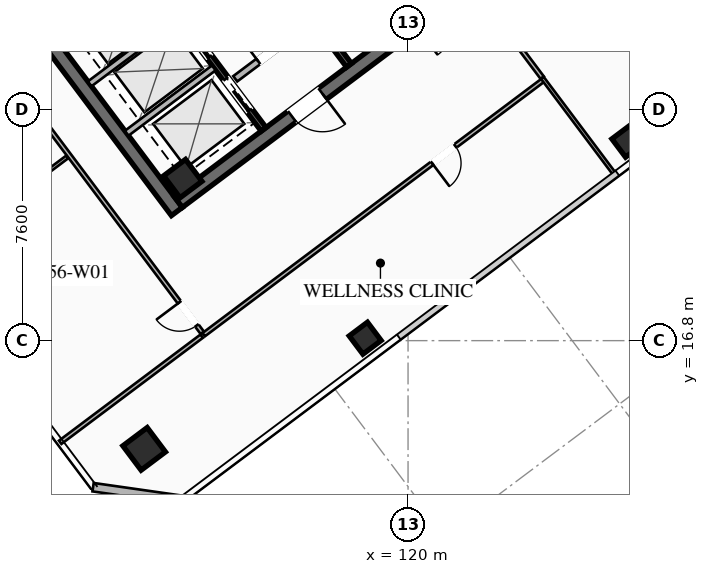
"""IFC4 building model, lengths in metres.
Left out: names, types, materials, properties, quantities, classifications, styles, units other than length and angle.
Written with IfcOpenShell. Run it as: python <this file> out.ifc"""

import sys

from ifc_helpers import new_model, si_unit, direction, frame, frame_2d, origin, origin_2d, place, context, subcontext, project, spatial, rectangle, hollow_rectangle, extrude, element, fill, save


model = new_model("IFC4")
c1 = context("Model", 3, precision=1e-05, world=origin(), true_north=direction((0.0, 1.0)))
c2 = subcontext(c1, "Body", "Model", "MODEL_VIEW")
j1 = project(units=[si_unit("LENGTHUNIT", "METRE"), si_unit("PLANEANGLEUNIT", "RADIAN")], contexts=[c1])
p1 = place(None, origin())
s1 = spatial("IfcSite", under=j1, at=p1, CompositionType="ELEMENT")
p2 = place(p1, origin())
s2 = spatial("IfcBuilding", under=s1, at=p2, CompositionType="ELEMENT")
p3 = place(p2, frame((0.0, 0.0, 207.75)))
s3 = spatial("IfcBuildingStorey", under=s2, at=p3, CompositionType="ELEMENT", Elevation=207.75)
p4 = place(p3, frame((112.396, 21.047, 0.0), z_axis=(0.0, 0.0, 1.0), x_axis=(-0.600005007985, 0.799996243986, 0.0)))
e1 = element("IfcWall", 1, at=p4, inside=s3, PredefinedType="SHEAR", context=c2, shape_type="SweptSolid", body=[
    extrude(rectangle(XDim=15.6, YDim=0.45, at=frame_2d((7.8, 0.0))), origin(), (0.0, 0.0, 1.0), 3.55),
])
p5 = place(p3, frame((124.649, 30.518, 0.0), z_axis=(0.0, 0.0, 1.0), x_axis=(-0.8, -0.6, 0.0)))
e2 = element("IfcWall", 2, at=p5, inside=s3, PredefinedType="SHEAR", context=c2, shape_type="SweptSolid", body=[
    extrude(rectangle(XDim=15.26, YDim=0.45, at=frame_2d((7.63, 0.0))), origin(), (0.0, 0.0, 1.0), 3.55),
])
p6 = place(p5, frame((9.33, 0.0, 0.0)))
e3 = element("IfcOpeningElement", 3, at=p6, cuts=e2, PredefinedType="OPENING", context=c2, shape_type="SweptSolid", body=[
    extrude(rectangle(XDim=1.25, YDim=2.25, at=frame_2d((0.625, 1.125))), frame((0.0, 0.235, 0.0), z_axis=(0.0, -1.0, 0.0), x_axis=(1.0, 0.0, 0.0)), (0.0, 0.0, 1.0), 0.47),
])
p7 = place(p5, frame((4.28, 0.0, 0.0)))
e4 = element("IfcOpeningElement", 4, at=p7, cuts=e2, PredefinedType="OPENING", context=c2, shape_type="SweptSolid", body=[
    extrude(rectangle(XDim=1.25, YDim=2.25, at=frame_2d((0.625, 1.125))), frame((0.0, 0.235, 0.0), z_axis=(0.0, -1.0, 0.0), x_axis=(1.0, 0.0, 0.0)), (0.0, 0.0, 1.0), 0.47),
])
p8 = place(p3, frame((112.59, 22.13, 0.0), z_axis=(0.0, 0.0, 1.0), x_axis=(0.799999996291, 0.600000004945, 0.0)))
e5 = element("IfcColumn", 5, at=p8, inside=s3, PredefinedType="COLUMN", context=c2, shape_type="SweptSolid", body=[
    extrude(hollow_rectangle(XDim=0.9, YDim=0.9, WallThickness=0.04, at=origin_2d()), origin(), (0.0, 0.0, 1.0), 3.37),
])
p9 = place(p3, frame((111.32, 13.24, 0.0), z_axis=(0.0, 0.0, 1.0), x_axis=(0.799999996291, 0.600000004945, 0.0)))
e6 = element("IfcColumn", 6, at=p9, inside=s3, PredefinedType="COLUMN", context=c2, shape_type="SweptSolid", body=[
    extrude(hollow_rectangle(XDim=1.0, YDim=1.0, WallThickness=0.04, at=origin_2d()), origin(), (0.0, 0.0, 1.0), 3.37),
])
for number, where, z_axis, x_axis in (
    (7, (118.59, 16.88, 0.0), (0.0, 0.0, 1.0), (0.8, 0.6, 0.0)),
    (8, (127.23, 23.36, 0.0), (0.0, 0.0, 1.0), (0.8, 0.6, 0.0)),
):
    element("IfcColumn", number, at=place(p3, frame(where, z_axis=z_axis, x_axis=x_axis)), inside=s3, PredefinedType="COLUMN", context=c2, shape_type="SweptSolid", body=[
        extrude(hollow_rectangle(XDim=0.75, YDim=0.75, WallThickness=0.032, at=origin_2d()), origin(), (0.0, 0.0, 1.0), 3.37),
    ])
p10 = place(p3, frame((112.58, 11.56, 0.0), z_axis=(0.0, 0.0, 1.0), x_axis=(-0.989954425158, 0.14138683146, 0.0)))
e9 = element("IfcWall", 9, at=p10, inside=s3, PredefinedType="SOLIDWALL", context=c2, shape_type="SweptSolid", body=[
    extrude(rectangle(XDim=2.97, YDim=0.28, at=frame_2d((1.485, 0.0))), origin(), (0.0, 0.0, 1.0), 3.37),
])
p11 = place(p3, frame((118.058, 25.856, 0.0), z_axis=(0.0, 0.0, 1.0), x_axis=(-0.600002657301, 0.799998007018, 0.0)))
e10 = element("IfcWall", 10, at=p11, inside=s3, PredefinedType="SHEAR", context=c2, shape_type="SweptSolid", body=[
    extrude(rectangle(XDim=14.7, YDim=0.2, at=frame_2d((7.35, 0.0))), origin(), (0.0, 0.0, 1.0), 3.37),
])
p12 = place(p3, frame((114.316, 25.412, 0.0), z_axis=(0.0, 0.0, 1.0), x_axis=(0.800018601094, 0.59997519774, 0.0)))
e11 = element("IfcWall", 11, at=p12, inside=s3, PredefinedType="SOLIDWALL", context=c2, shape_type="SweptSolid", body=[
    extrude(rectangle(XDim=3.15, YDim=0.22, at=frame_2d((1.575, 0.0))), origin(), (0.0, 0.0, 1.0), 2.723),
])
p13 = place(p12, frame((0.95, 0.0, 0.0)))
e12 = element("IfcOpeningElement", 12, at=p13, cuts=e11, PredefinedType="OPENING", context=c2, shape_type="SweptSolid", body=[
    extrude(rectangle(XDim=1.25, YDim=2.25, at=frame_2d((0.625, 1.125))), frame((0.0, 0.12, 0.0), z_axis=(0.0, -1.0, 0.0), x_axis=(1.0, 0.0, 0.0)), (0.0, 0.0, 1.0), 0.24),
])
p14 = place(p3, frame((115.25, 23.75, 0.0), z_axis=(0.0, 0.0, 1.0), x_axis=(-0.599994036198, 0.800004472816, 0.0)))
e13 = element("IfcWall", 13, at=p14, inside=s3, PredefinedType="SHEAR", context=c2, shape_type="SweptSolid", body=[
    extrude(rectangle(XDim=6.55, YDim=0.2, at=frame_2d((3.275, 0.0))), origin(), (0.0, 0.0, 1.0), 3.37),
])
p15 = place(p14, frame((4.975, 0.0, 0.0)))
e14 = element("IfcOpeningElement", 14, at=p15, cuts=e13, PredefinedType="OPENING", context=c2, shape_type="SweptSolid", body=[
    extrude(rectangle(XDim=1.3, YDim=2.25, at=frame_2d((0.65, 1.125))), frame((0.0, 0.11, 0.0), z_axis=(0.0, -1.0, 0.0), x_axis=(1.0, 0.0, 0.0)), (0.0, 0.0, 1.0), 0.22),
])
p16 = place(p14, frame((2.975, 0.0, 0.0)))
e15 = element("IfcOpeningElement", 15, at=p16, cuts=e13, PredefinedType="OPENING", context=c2, shape_type="SweptSolid", body=[
    extrude(rectangle(XDim=1.3, YDim=2.25, at=frame_2d((0.65, 1.125))), frame((0.0, 0.11, 0.0), z_axis=(0.0, -1.0, 0.0), x_axis=(1.0, 0.0, 0.0)), (0.0, 0.0, 1.0), 0.22),
])
p17 = place(p14, frame((0.775, 0.0, 0.0)))
e16 = element("IfcOpeningElement", 16, at=p17, cuts=e13, PredefinedType="OPENING", context=c2, shape_type="SweptSolid", body=[
    extrude(rectangle(XDim=1.3, YDim=2.25, at=frame_2d((0.65, 1.125))), frame((0.0, 0.11, 0.0), z_axis=(0.0, -1.0, 0.0), x_axis=(1.0, 0.0, 0.0)), (0.0, 0.0, 1.0), 0.22),
])
for number, where, z_axis, x_axis in (
    (17, (110.746, 23.622, 0.0), (0.0, 0.0, 1.0), (0.8, 0.6, 0.0)),
    (18, (109.528, 25.246, 0.0), (0.0, 0.0, 1.0), (0.8, 0.6, 0.0)),
):
    element("IfcWall", number, at=place(p3, frame(where, z_axis=z_axis, x_axis=x_axis)), inside=s3, PredefinedType="SOLIDWALL", context=c2, shape_type="SweptSolid", body=[
        extrude(rectangle(XDim=3.58, YDim=0.2, at=frame_2d((1.79, 0.0))), origin(), (0.0, 0.0, 1.0), 3.37),
    ])
p18 = place(p3, frame((124.462, 25.384, 0.0), z_axis=(0.0, 0.0, 1.0), x_axis=(-0.799997904343, -0.6000027942, 0.0)))
e19 = element("IfcWall", 19, at=p18, inside=s3, PredefinedType="PARTITIONING", context=c2, shape_type="SweptSolid", body=[
    extrude(rectangle(XDim=13.98, YDim=0.135, at=frame_2d((6.99, 0.0))), origin(), (0.0, 0.0, 1.0), 2.723),
])
p19 = place(p18, frame((3.635, 0.0, 0.0)))
e20 = element("IfcOpeningElement", 20, at=p19, cuts=e19, PredefinedType="OPENING", context=c2, shape_type="SweptSolid", body=[
    extrude(rectangle(XDim=0.95, YDim=2.05, at=frame_2d((0.475, 1.025))), frame((0.0, 0.077, 0.0), z_axis=(0.0, -1.0, 0.0), x_axis=(1.0, 0.0, 0.0)), (0.0, 0.0, 1.0), 0.155),
])
p20 = place(p3, frame((122.248, 28.336, 0.0), z_axis=(0.0, 0.0, 1.0), x_axis=(0.600010820699, -0.799991884361, 0.0)))
e21 = element("IfcWall", 21, at=p20, inside=s3, PredefinedType="PARTITIONING", context=c2, shape_type="SweptSolid", body=[
    extrude(rectangle(XDim=3.61, YDim=0.135, at=frame_2d((1.805, 0.0))), origin(), (0.0, 0.0, 1.0), 2.723),
])
p21 = place(p20, frame((0.25, 0.0, 0.0)))
e22 = element("IfcOpeningElement", 22, at=p21, cuts=e21, PredefinedType="OPENING", context=c2, shape_type="SweptSolid", body=[
    extrude(rectangle(XDim=0.95, YDim=2.05, at=frame_2d((0.475, 1.025))), frame((0.0, 0.077, 0.0), z_axis=(0.0, -1.0, 0.0), x_axis=(1.0, 0.0, 0.0)), (0.0, 0.0, 1.0), 0.155),
])
p22 = place(p3, frame((126.808, 22.256, 0.0), z_axis=(0.0, 0.0, 1.0), x_axis=(-0.600019580308, 0.799985314394, 0.0)))
e23 = element("IfcWall", 23, at=p22, inside=s3, PredefinedType="PARTITIONING", context=c2, shape_type="SweptSolid", body=[
    extrude(rectangle(XDim=3.99, YDim=0.11, at=frame_2d((1.995, 0.0))), origin(), (0.0, 0.0, 1.0), 2.723),
])
p23 = place(p3, frame((113.23, 17.06, 0.0), z_axis=(0.0, 0.0, 1.0), x_axis=(-0.600003772342, 0.79999717073, 0.0)))
e24 = element("IfcWall", 24, at=p23, inside=s3, PredefinedType="PARTITIONING", context=c2, shape_type="SweptSolid", body=[
    extrude(rectangle(XDim=20.71, YDim=0.135, at=frame_2d((10.355, 0.0))), origin(), (0.0, 0.0, 1.0), 2.723),
])
p24 = place(p23, frame((0.3, 0.0, 0.0)))
e25 = element("IfcOpeningElement", 25, at=p24, cuts=e24, PredefinedType="OPENING", context=c2, shape_type="SweptSolid", body=[
    extrude(rectangle(XDim=0.95, YDim=2.05, at=frame_2d((0.475, 1.025))), frame((0.0, 0.077, 0.0), z_axis=(0.0, -1.0, 0.0), x_axis=(1.0, 0.0, 0.0)), (0.0, 0.0, 1.0), 0.155),
])
p25 = place(p23, frame((11.272, 0.0, 0.0)))
e26 = element("IfcOpeningElement", 26, at=p25, cuts=e24, PredefinedType="OPENING", context=c2, shape_type="SweptSolid", body=[
    extrude(rectangle(XDim=0.95, YDim=2.05, at=frame_2d((0.475, 1.025))), frame((0.0, 0.077, 0.0), z_axis=(0.0, -1.0, 0.0), x_axis=(1.0, 0.0, 0.0)), (0.0, 0.0, 1.0), 0.155),
])
p26 = place(p23, frame((19.46, 0.0, 0.0)))
e27 = element("IfcOpeningElement", 27, at=p26, cuts=e24, PredefinedType="OPENING", context=c2, shape_type="SweptSolid", body=[
    extrude(rectangle(XDim=0.95, YDim=2.05, at=frame_2d((0.475, 1.025))), frame((0.0, 0.077, 0.0), z_axis=(0.0, -1.0, 0.0), x_axis=(1.0, 0.0, 0.0)), (0.0, 0.0, 1.0), 0.155),
])
p27 = place(p3, frame((108.558, 13.456, 0.0), z_axis=(0.0, 0.0, 1.0), x_axis=(0.800005033825, 0.599993288175, 0.0)))
e28 = element("IfcWall", 28, at=p27, inside=s3, PredefinedType="PARTITIONING", context=c2, shape_type="SweptSolid", body=[
    extrude(rectangle(XDim=5.82, YDim=0.135, at=frame_2d((2.91, 0.0))), origin(), (0.0, 0.0, 1.0), 2.723),
])
p28 = place(p3, frame((104.136, 19.352, 0.0), z_axis=(0.0, 0.0, 1.0), x_axis=(0.800005033825, 0.599993288175, 0.0)))
e29 = element("IfcWall", 29, at=p28, inside=s3, PredefinedType="PARTITIONING", context=c2, shape_type="SweptSolid", body=[
    extrude(rectangle(XDim=5.82, YDim=0.11, at=frame_2d((2.91, 0.0))), origin(), (0.0, 0.0, 1.0), 2.723),
])
p29 = place(p6, origin())
e30 = element("IfcDoor", 30, at=p29, inside=s3, OperationType="SINGLE_SWING_LEFT", PredefinedType="DOOR", context=c2, shape_type="SweptSolid", body=[
    extrude(rectangle(XDim=1.25, YDim=2.25, at=frame_2d((0.625, 1.125))), frame((0.0, 0.025, 0.0), z_axis=(0.0, -1.0, 0.0), x_axis=(1.0, 0.0, 0.0)), (0.0, 0.0, 1.0), 0.05),
])
fill(e3, e30)
p30 = place(p13, origin())
e31 = element("IfcDoor", 31, at=p30, inside=s3, OperationType="SINGLE_SWING_LEFT", PredefinedType="DOOR", context=c2, shape_type="SweptSolid", body=[
    extrude(rectangle(XDim=1.25, YDim=2.25, at=frame_2d((0.625, 1.125))), frame((0.0, 0.025, 0.0), z_axis=(0.0, -1.0, 0.0), x_axis=(1.0, 0.0, 0.0)), (0.0, 0.0, 1.0), 0.05),
])
fill(e12, e31)
p31 = place(p19, origin())
e32 = element("IfcDoor", 32, at=p31, inside=s3, OperationType="SINGLE_SWING_RIGHT", PredefinedType="DOOR", context=c2, shape_type="SweptSolid", body=[
    extrude(rectangle(XDim=0.95, YDim=2.05, at=frame_2d((0.475, 1.025))), frame((0.0, 0.025, 0.0), z_axis=(0.0, -1.0, 0.0), x_axis=(1.0, 0.0, 0.0)), (0.0, 0.0, 1.0), 0.05),
])
fill(e20, e32)
p32 = place(p24, origin())
e33 = element("IfcDoor", 33, at=p32, inside=s3, OperationType="SINGLE_SWING_RIGHT", PredefinedType="DOOR", context=c2, shape_type="SweptSolid", body=[
    extrude(rectangle(XDim=0.95, YDim=2.05, at=frame_2d((0.475, 1.025))), frame((0.0, 0.025, 0.0), z_axis=(0.0, -1.0, 0.0), x_axis=(1.0, 0.0, 0.0)), (0.0, 0.0, 1.0), 0.05),
])
fill(e25, e33)
p33 = place(p16, origin())
e34 = element("IfcDoor", 34, at=p33, inside=s3, OperationType="SLIDING_TO_LEFT", PredefinedType="DOOR", context=c2, shape_type="SweptSolid", body=[
    extrude(rectangle(XDim=1.3, YDim=2.25, at=frame_2d((0.65, 1.125))), frame((0.0, 0.025, 0.0), z_axis=(0.0, -1.0, 0.0), x_axis=(1.0, 0.0, 0.0)), (0.0, 0.0, 1.0), 0.05),
])
fill(e15, e34)
p34 = place(p17, origin())
e35 = element("IfcDoor", 35, at=p34, inside=s3, OperationType="SLIDING_TO_LEFT", PredefinedType="DOOR", context=c2, shape_type="SweptSolid", body=[
    extrude(rectangle(XDim=1.3, YDim=2.25, at=frame_2d((0.65, 1.125))), frame((0.0, 0.025, 0.0), z_axis=(0.0, -1.0, 0.0), x_axis=(1.0, 0.0, 0.0)), (0.0, 0.0, 1.0), 0.05),
])
fill(e16, e35)
save(model, sys.argv[1])
